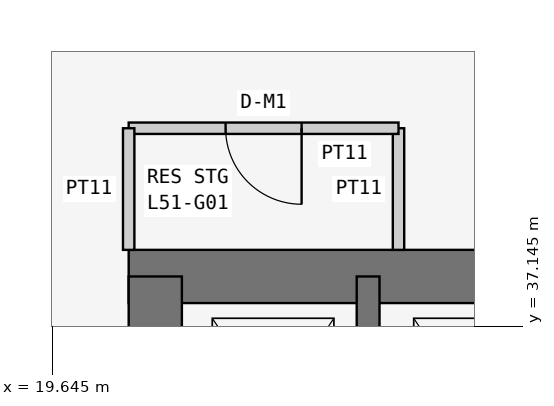
"""IFC4 building model, lengths in metres.
Left out: names, types, materials, properties, quantities, classifications, styles, units other than length and angle.
Written with IfcOpenShell. Run it as: python <this file> out.ifc"""

import sys

from ifc_helpers import new_model, si_unit, direction, frame, frame_2d, origin, place, context, subcontext, project, spatial, rectangle, extrude, element, fill, save


model = new_model("IFC4")
c1 = context("Model", 3, precision=1e-05, world=origin(), true_north=direction((0.0, 1.0)))
c2 = subcontext(c1, "Body", "Model", "MODEL_VIEW")
j1 = project(units=[si_unit("LENGTHUNIT", "METRE"), si_unit("PLANEANGLEUNIT", "RADIAN")], contexts=[c1])
p1 = place(None, origin())
s1 = spatial("IfcSite", under=j1, at=p1, CompositionType="ELEMENT")
p2 = place(p1, origin())
s2 = spatial("IfcBuilding", under=s1, at=p2, CompositionType="ELEMENT")
p3 = place(p2, frame((0.0, 0.0, 197.7)))
s3 = spatial("IfcBuildingStorey", under=s2, at=p3, CompositionType="ELEMENT", Elevation=197.7)
p4 = place(p3, frame((37.8, 37.8, 0.0), z_axis=(0.0, 0.0, 1.0), x_axis=(-1.0, 0.0, 0.0)))
e1 = element("IfcWall", 1, at=p4, inside=s3, PredefinedType="SHEAR", context=c2, shape_type="SweptSolid", body=[
    extrude(rectangle(XDim=17.15, YDim=0.7, at=frame_2d((8.575, 0.0))), origin(), (0.0, 0.0, 1.0), 3.6),
])
p5 = place(p3, frame((21.0, 37.8, 0.0), z_axis=(0.0, 0.0, 1.0), x_axis=(0.0, -1.0, 0.0)))
e2 = element("IfcWall", 2, at=p5, inside=s3, PredefinedType="SHEAR", context=c2, shape_type="SweptSolid", body=[
    extrude(rectangle(XDim=17.15, YDim=0.7, at=frame_2d((8.575, 0.0))), origin(), (0.0, 0.0, 1.0), 3.6),
])
p6 = place(p5, frame((5.4, 0.0, 0.0)))
e3 = element("IfcOpeningElement", 3, at=p6, cuts=e2, PredefinedType="OPENING", context=c2, shape_type="SweptSolid", body=[
    extrude(rectangle(XDim=1.2, YDim=2.1, at=frame_2d((0.6, 1.05))), frame((0.0, 0.36, 0.0), z_axis=(0.0, -1.0, 0.0), x_axis=(1.0, 0.0, 0.0)), (0.0, 0.0, 1.0), 0.72),
])
p7 = place(p3, frame((23.8, 34.6, 0.0), z_axis=(0.0, 0.0, 1.0), x_axis=(0.0, 1.0, 0.0)))
e4 = element("IfcWall", 4, at=p7, inside=s3, PredefinedType="SHEAR", context=c2, shape_type="SweptSolid", body=[
    extrude(rectangle(XDim=3.2, YDim=0.3, at=frame_2d((1.6, 0.0))), origin(), (0.0, 0.0, 1.0), 3.6),
])
p8 = place(p3, frame((24.2, 38.15, 0.0), z_axis=(0.0, 0.0, 1.0), x_axis=(0.0, 1.0, 0.0)))
e5 = element("IfcWall", 5, at=p8, inside=s3, PredefinedType="PARTITIONING", context=c2, shape_type="SweptSolid", body=[
    extrude(rectangle(XDim=1.6, YDim=0.15, at=frame_2d((0.8, 0.0))), origin(), (0.0, 0.0, 1.0), 3.45),
])
p9 = place(p3, frame((24.2, 39.75, 0.0), z_axis=(0.0, 0.0, 1.0), x_axis=(-1.0, 0.0, 0.0)))
e6 = element("IfcWall", 6, at=p9, inside=s3, PredefinedType="PARTITIONING", context=c2, shape_type="SweptSolid", body=[
    extrude(rectangle(XDim=3.55, YDim=0.15, at=frame_2d((1.775, 0.0))), origin(), (0.0, 0.0, 1.0), 3.45),
])
p10 = place(p9, frame((1.275, 0.0, 0.0)))
e7 = element("IfcOpeningElement", 7, at=p10, cuts=e6, PredefinedType="OPENING", context=c2, shape_type="SweptSolid", body=[
    extrude(rectangle(XDim=1.0, YDim=2.1, at=frame_2d((0.5, 1.05))), frame((0.0, 0.085, 0.0), z_axis=(0.0, -1.0, 0.0), x_axis=(1.0, 0.0, 0.0)), (0.0, 0.0, 1.0), 0.17),
])
p11 = place(p3, frame((20.65, 39.75, 0.0), z_axis=(0.0, 0.0, 1.0), x_axis=(0.0, -1.0, 0.0)))
e8 = element("IfcWall", 8, at=p11, inside=s3, PredefinedType="PARTITIONING", context=c2, shape_type="SweptSolid", body=[
    extrude(rectangle(XDim=1.6, YDim=0.15, at=frame_2d((0.8, 0.0))), origin(), (0.0, 0.0, 1.0), 3.45),
])
p12 = place(p10, origin())
e9 = element("IfcDoor", 9, at=p12, inside=s3, OperationType="SINGLE_SWING_LEFT", PredefinedType="DOOR", context=c2, shape_type="SweptSolid", body=[
    extrude(rectangle(XDim=1.0, YDim=2.1, at=frame_2d((0.5, 1.05))), frame((0.0, 0.025, 0.0), z_axis=(0.0, -1.0, 0.0), x_axis=(1.0, 0.0, 0.0)), (0.0, 0.0, 1.0), 0.05),
])
fill(e7, e9)
save(model, sys.argv[1])
